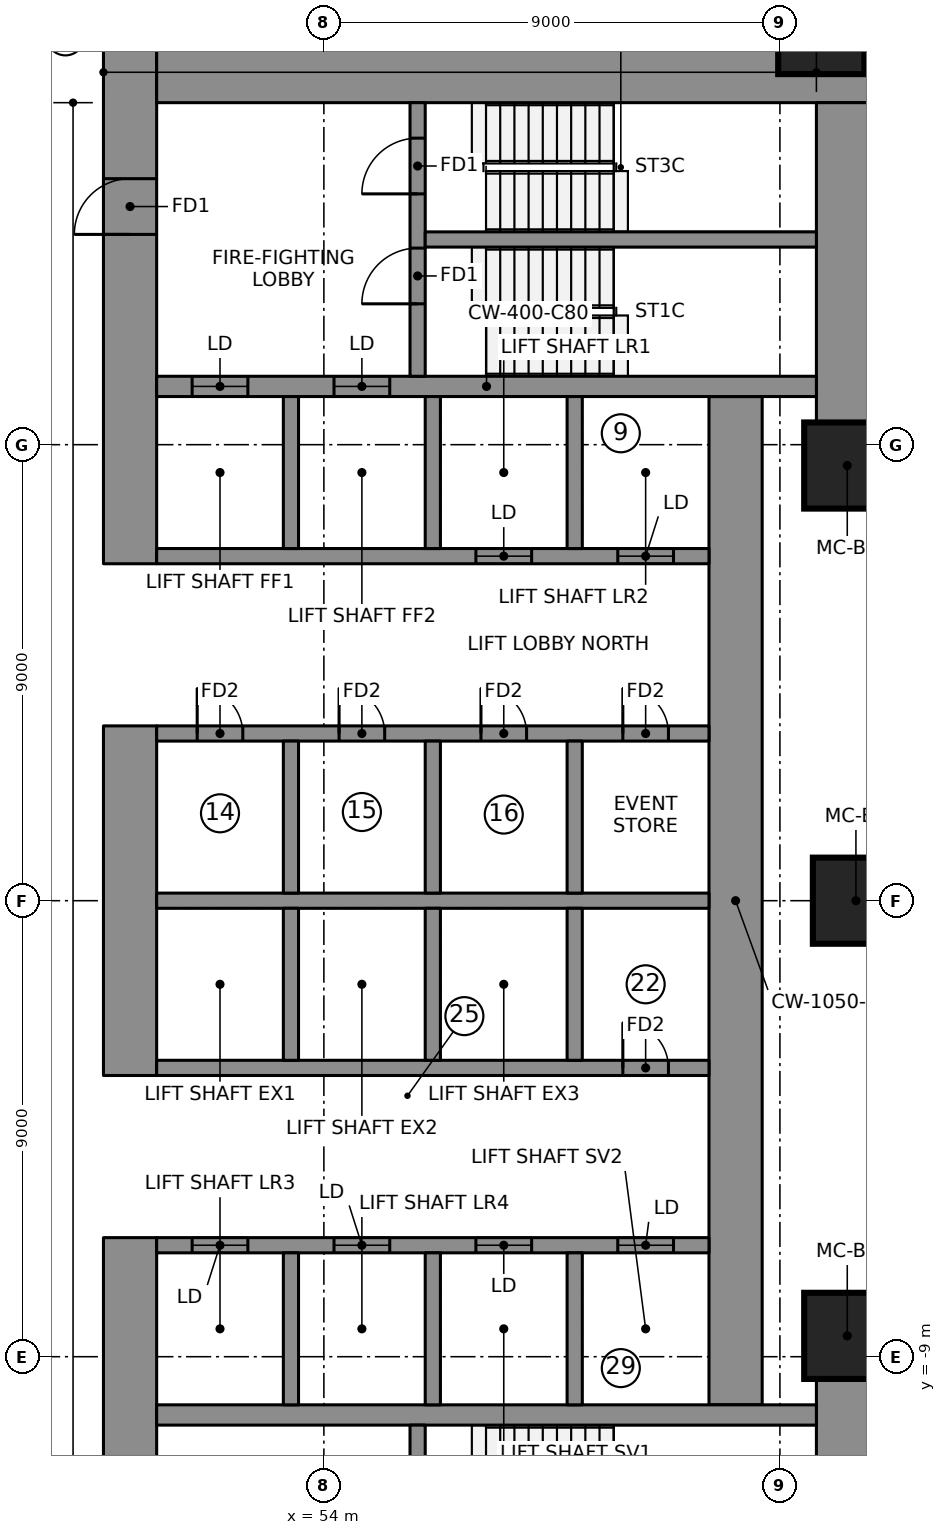
"""IFC4 building model, lengths in metres.
Left out: names, types, materials, properties, quantities, classifications, styles, units other than length and angle.
Written with IfcOpenShell. Run it as: python <this file> out.ifc"""

import sys

from ifc_helpers import new_model, si_unit, direction, frame, frame_2d, origin, origin_2d, place, context, subcontext, project, spatial, rectangle, extrude, element, fill, save


model = new_model("IFC4")
c1 = context("Model", 3, precision=1e-05, world=origin(), true_north=direction((0.0, 1.0)))
c2 = subcontext(c1, "Body", "Model", "MODEL_VIEW")
j1 = project(units=[si_unit("LENGTHUNIT", "METRE"), si_unit("PLANEANGLEUNIT", "RADIAN")], contexts=[c1])
p1 = place(None, origin())
s1 = spatial("IfcSite", under=j1, at=p1, CompositionType="ELEMENT")
p2 = place(p1, origin())
s2 = spatial("IfcBuilding", under=s1, at=p2, CompositionType="ELEMENT")
p3 = place(p2, frame((0.0, 0.0, 99.1)))
s3 = spatial("IfcBuildingStorey", under=s2, at=p3, CompositionType="ELEMENT", Elevation=99.1)
p4 = place(p3, frame((50.175, 6.65, 0.0), z_axis=(0.0, 0.0, 1.0), x_axis=(0.0, 1.0, 0.0)))
e1 = element("IfcWall", 1, at=p4, inside=s3, PredefinedType="SHEAR", context=c2, shape_type="SweptSolid", body=[
    extrude(rectangle(XDim=10.15, YDim=1.05, at=frame_2d((5.075, 0.0))), origin(), (0.0, 0.0, 1.0), 3.55),
])
p5 = place(p4, frame((6.5, 0.0, 0.0)))
e2 = element("IfcOpeningElement", 2, at=p5, cuts=e1, PredefinedType="OPENING", context=c2, shape_type="SweptSolid", body=[
    extrude(rectangle(XDim=1.1, YDim=2.1, at=frame_2d((0.55, 1.05))), frame((0.0, 0.535, 0.0), z_axis=(0.0, -1.0, 0.0), x_axis=(1.0, 0.0, 0.0)), (0.0, 0.0, 1.0), 1.07),
])
p6 = place(p3, frame((50.175, -3.45, 0.0), z_axis=(0.0, 0.0, 1.0), x_axis=(0.0, 1.0, 0.0)))
e3 = element("IfcWall", 3, at=p6, inside=s3, PredefinedType="SHEAR", context=c2, shape_type="SweptSolid", body=[
    extrude(rectangle(XDim=6.9, YDim=1.05, at=frame_2d((3.45, 0.0))), origin(), (0.0, 0.0, 1.0), 3.55),
])
p7 = place(p3, frame((50.175, -16.8, 0.0), z_axis=(0.0, 0.0, 1.0), x_axis=(0.0, 1.0, 0.0)))
e4 = element("IfcWall", 4, at=p7, inside=s3, PredefinedType="SHEAR", context=c2, shape_type="SweptSolid", body=[
    extrude(rectangle(XDim=10.15, YDim=1.05, at=frame_2d((5.075, 0.0))), origin(), (0.0, 0.0, 1.0), 3.55),
])
p8 = place(p7, frame((2.55, 0.0, 0.0)))
e5 = element("IfcOpeningElement", 5, at=p8, cuts=e4, PredefinedType="OPENING", context=c2, shape_type="SweptSolid", body=[
    extrude(rectangle(XDim=1.1, YDim=2.1, at=frame_2d((0.55, 1.05))), frame((0.0, 0.535, 0.0), z_axis=(0.0, -1.0, 0.0), x_axis=(1.0, 0.0, 0.0)), (0.0, 0.0, 1.0), 1.07),
])
p9 = place(p3, frame((50.7, 16.275, 0.0), z_axis=(0.0, 0.0, 1.0), x_axis=(1.0, 0.0, 0.0)))
e6 = element("IfcWall", 6, at=p9, inside=s3, PredefinedType="SHEAR", context=c2, shape_type="SweptSolid", body=[
    extrude(rectangle(XDim=14.07, YDim=1.05, at=frame_2d((7.035, 0.0))), origin(), (0.0, 0.0, 1.0), 3.55),
])
for number, where, z_axis, x_axis in (
    (7, (64.245, 9.389, 0.0), (0.0, 0.0, 1.0), (0.0, 1.0, 0.0)),
    (8, (64.245, -15.75, 0.0), (0.0, 0.0, 1.0), (0.0, 1.0, 0.0)),
):
    element("IfcWall", number, at=place(p3, frame(where, z_axis=z_axis, x_axis=x_axis)), inside=s3, PredefinedType="SHEAR", context=c2, shape_type="SweptSolid", body=[
        extrude(rectangle(XDim=6.361, YDim=1.05, at=frame_2d((3.181, 0.0))), origin(), (0.0, 0.0, 1.0), 3.55),
    ])
p10 = place(p3, frame((62.125, -9.95, 0.0), z_axis=(0.0, 0.0, 1.0), x_axis=(0.0, 1.0, 0.0)))
e9 = element("IfcWall", 9, at=p10, inside=s3, PredefinedType="SHEAR", context=c2, shape_type="SweptSolid", body=[
    extrude(rectangle(XDim=19.9, YDim=1.05, at=frame_2d((9.95, 0.0))), origin(), (0.0, 0.0, 1.0), 3.55),
])
p11 = place(p3, frame((50.7, 10.15, 0.0), z_axis=(0.0, 0.0, 1.0), x_axis=(1.0, 0.0, 0.0)))
e10 = element("IfcWall", 10, at=p11, inside=s3, PredefinedType="SHEAR", context=c2, shape_type="SweptSolid", body=[
    extrude(rectangle(XDim=13.02, YDim=0.4, at=frame_2d((6.51, 0.0))), origin(), (0.0, 0.0, 1.0), 3.55),
])
p12 = place(p11, frame((0.7, 0.0, 0.0)))
e11 = element("IfcOpeningElement", 11, at=p12, cuts=e10, PredefinedType="OPENING", context=c2, shape_type="SweptSolid", body=[
    extrude(rectangle(XDim=1.1, YDim=2.1, at=frame_2d((0.55, 1.05))), frame((0.0, 0.21, 0.0), z_axis=(0.0, -1.0, 0.0), x_axis=(1.0, 0.0, 0.0)), (0.0, 0.0, 1.0), 0.42),
])
p13 = place(p11, frame((3.5, 0.0, 0.0)))
e12 = element("IfcOpeningElement", 12, at=p13, cuts=e10, PredefinedType="OPENING", context=c2, shape_type="SweptSolid", body=[
    extrude(rectangle(XDim=1.1, YDim=2.1, at=frame_2d((0.55, 1.05))), frame((0.0, 0.21, 0.0), z_axis=(0.0, -1.0, 0.0), x_axis=(1.0, 0.0, 0.0)), (0.0, 0.0, 1.0), 0.42),
])
p14 = place(p3, frame((50.7, -10.15, 0.0), z_axis=(0.0, 0.0, 1.0), x_axis=(1.0, 0.0, 0.0)))
e13 = element("IfcWall", 13, at=p14, inside=s3, PredefinedType="SHEAR", context=c2, shape_type="SweptSolid", body=[
    extrude(rectangle(XDim=13.02, YDim=0.4, at=frame_2d((6.51, 0.0))), origin(), (0.0, 0.0, 1.0), 3.55),
])
p15 = place(p3, frame((50.7, 0.0, 0.0), z_axis=(0.0, 0.0, 1.0), x_axis=(1.0, 0.0, 0.0)))
e14 = element("IfcWall", 14, at=p15, inside=s3, PredefinedType="SHEAR", context=c2, shape_type="SweptSolid", body=[
    extrude(rectangle(XDim=10.9, YDim=0.3, at=frame_2d((5.45, 0.0))), origin(), (0.0, 0.0, 1.0), 3.55),
])
p16 = place(p3, frame((50.7, 3.3, 0.0), z_axis=(0.0, 0.0, 1.0), x_axis=(1.0, 0.0, 0.0)))
e15 = element("IfcWall", 15, at=p16, inside=s3, PredefinedType="SHEAR", context=c2, shape_type="SweptSolid", body=[
    extrude(rectangle(XDim=10.9, YDim=0.3, at=frame_2d((5.45, 0.0))), origin(), (0.0, 0.0, 1.0), 3.55),
])
p17 = place(p16, frame((0.8, 0.0, 0.0)))
e16 = element("IfcOpeningElement", 16, at=p17, cuts=e15, PredefinedType="OPENING", context=c2, shape_type="SweptSolid", body=[
    extrude(rectangle(XDim=0.9, YDim=2.1, at=frame_2d((0.45, 1.05))), frame((0.0, 0.16, 0.0), z_axis=(0.0, -1.0, 0.0), x_axis=(1.0, 0.0, 0.0)), (0.0, 0.0, 1.0), 0.32),
])
p18 = place(p16, frame((3.6, 0.0, 0.0)))
e17 = element("IfcOpeningElement", 17, at=p18, cuts=e15, PredefinedType="OPENING", context=c2, shape_type="SweptSolid", body=[
    extrude(rectangle(XDim=0.9, YDim=2.1, at=frame_2d((0.45, 1.05))), frame((0.0, 0.16, 0.0), z_axis=(0.0, -1.0, 0.0), x_axis=(1.0, 0.0, 0.0)), (0.0, 0.0, 1.0), 0.32),
])
p19 = place(p16, frame((6.4, 0.0, 0.0)))
e18 = element("IfcOpeningElement", 18, at=p19, cuts=e15, PredefinedType="OPENING", context=c2, shape_type="SweptSolid", body=[
    extrude(rectangle(XDim=0.9, YDim=2.1, at=frame_2d((0.45, 1.05))), frame((0.0, 0.16, 0.0), z_axis=(0.0, -1.0, 0.0), x_axis=(1.0, 0.0, 0.0)), (0.0, 0.0, 1.0), 0.32),
])
p20 = place(p16, frame((9.2, 0.0, 0.0)))
e19 = element("IfcOpeningElement", 19, at=p20, cuts=e15, PredefinedType="OPENING", context=c2, shape_type="SweptSolid", body=[
    extrude(rectangle(XDim=0.9, YDim=2.1, at=frame_2d((0.45, 1.05))), frame((0.0, 0.16, 0.0), z_axis=(0.0, -1.0, 0.0), x_axis=(1.0, 0.0, 0.0)), (0.0, 0.0, 1.0), 0.32),
])
p21 = place(p3, frame((50.7, 6.8, 0.0), z_axis=(0.0, 0.0, 1.0), x_axis=(1.0, 0.0, 0.0)))
e20 = element("IfcWall", 20, at=p21, inside=s3, PredefinedType="SHEAR", context=c2, shape_type="SweptSolid", body=[
    extrude(rectangle(XDim=10.9, YDim=0.3, at=frame_2d((5.45, 0.0))), origin(), (0.0, 0.0, 1.0), 3.55),
])
p22 = place(p21, frame((6.3, 0.0, 0.0)))
e21 = element("IfcOpeningElement", 21, at=p22, cuts=e20, PredefinedType="OPENING", context=c2, shape_type="SweptSolid", body=[
    extrude(rectangle(XDim=1.1, YDim=2.1, at=frame_2d((0.55, 1.05))), frame((0.0, 0.16, 0.0), z_axis=(0.0, -1.0, 0.0), x_axis=(1.0, 0.0, 0.0)), (0.0, 0.0, 1.0), 0.32),
])
p23 = place(p21, frame((9.1, 0.0, 0.0)))
e22 = element("IfcOpeningElement", 22, at=p23, cuts=e20, PredefinedType="OPENING", context=c2, shape_type="SweptSolid", body=[
    extrude(rectangle(XDim=1.1, YDim=2.1, at=frame_2d((0.55, 1.05))), frame((0.0, 0.16, 0.0), z_axis=(0.0, -1.0, 0.0), x_axis=(1.0, 0.0, 0.0)), (0.0, 0.0, 1.0), 0.32),
])
for number, where, z_axis, x_axis in (
    (23, (53.35, 0.15, 0.0), (0.0, 0.0, 1.0), (0.0, 1.0, 0.0)),
    (24, (53.35, 6.95, 0.0), (0.0, 0.0, 1.0), (0.0, 1.0, 0.0)),
    (25, (56.15, 0.15, 0.0), (0.0, 0.0, 1.0), (0.0, 1.0, 0.0)),
    (26, (56.15, 6.95, 0.0), (0.0, 0.0, 1.0), (0.0, 1.0, 0.0)),
    (27, (58.95, 0.15, 0.0), (0.0, 0.0, 1.0), (0.0, 1.0, 0.0)),
    (28, (58.95, 6.95, 0.0), (0.0, 0.0, 1.0), (0.0, 1.0, 0.0)),
):
    element("IfcWall", number, at=place(p3, frame(where, z_axis=z_axis, x_axis=x_axis)), inside=s3, PredefinedType="SHEAR", context=c2, shape_type="SweptSolid", body=[
        extrude(rectangle(XDim=3.0, YDim=0.3, at=frame_2d((1.5, 0.0))), origin(), (0.0, 0.0, 1.0), 3.55),
    ])
p24 = place(p3, frame((50.7, -3.3, 0.0), z_axis=(0.0, 0.0, 1.0), x_axis=(1.0, 0.0, 0.0)))
e29 = element("IfcWall", 29, at=p24, inside=s3, PredefinedType="SHEAR", context=c2, shape_type="SweptSolid", body=[
    extrude(rectangle(XDim=10.9, YDim=0.3, at=frame_2d((5.45, 0.0))), origin(), (0.0, 0.0, 1.0), 3.55),
])
p25 = place(p24, frame((9.2, 0.0, 0.0)))
e30 = element("IfcOpeningElement", 30, at=p25, cuts=e29, PredefinedType="OPENING", context=c2, shape_type="SweptSolid", body=[
    extrude(rectangle(XDim=0.9, YDim=2.1, at=frame_2d((0.45, 1.05))), frame((0.0, 0.16, 0.0), z_axis=(0.0, -1.0, 0.0), x_axis=(1.0, 0.0, 0.0)), (0.0, 0.0, 1.0), 0.32),
])
p26 = place(p3, frame((50.7, -6.8, 0.0), z_axis=(0.0, 0.0, 1.0), x_axis=(1.0, 0.0, 0.0)))
e31 = element("IfcWall", 31, at=p26, inside=s3, PredefinedType="SHEAR", context=c2, shape_type="SweptSolid", body=[
    extrude(rectangle(XDim=10.9, YDim=0.3, at=frame_2d((5.45, 0.0))), origin(), (0.0, 0.0, 1.0), 3.55),
])
p27 = place(p26, frame((0.7, 0.0, 0.0)))
e32 = element("IfcOpeningElement", 32, at=p27, cuts=e31, PredefinedType="OPENING", context=c2, shape_type="SweptSolid", body=[
    extrude(rectangle(XDim=1.1, YDim=2.1, at=frame_2d((0.55, 1.05))), frame((0.0, 0.16, 0.0), z_axis=(0.0, -1.0, 0.0), x_axis=(1.0, 0.0, 0.0)), (0.0, 0.0, 1.0), 0.32),
])
p28 = place(p26, frame((3.5, 0.0, 0.0)))
e33 = element("IfcOpeningElement", 33, at=p28, cuts=e31, PredefinedType="OPENING", context=c2, shape_type="SweptSolid", body=[
    extrude(rectangle(XDim=1.1, YDim=2.1, at=frame_2d((0.55, 1.05))), frame((0.0, 0.16, 0.0), z_axis=(0.0, -1.0, 0.0), x_axis=(1.0, 0.0, 0.0)), (0.0, 0.0, 1.0), 0.32),
])
p29 = place(p26, frame((6.3, 0.0, 0.0)))
e34 = element("IfcOpeningElement", 34, at=p29, cuts=e31, PredefinedType="OPENING", context=c2, shape_type="SweptSolid", body=[
    extrude(rectangle(XDim=1.1, YDim=2.1, at=frame_2d((0.55, 1.05))), frame((0.0, 0.16, 0.0), z_axis=(0.0, -1.0, 0.0), x_axis=(1.0, 0.0, 0.0)), (0.0, 0.0, 1.0), 0.32),
])
p30 = place(p26, frame((9.1, 0.0, 0.0)))
e35 = element("IfcOpeningElement", 35, at=p30, cuts=e31, PredefinedType="OPENING", context=c2, shape_type="SweptSolid", body=[
    extrude(rectangle(XDim=1.1, YDim=2.1, at=frame_2d((0.55, 1.05))), frame((0.0, 0.16, 0.0), z_axis=(0.0, -1.0, 0.0), x_axis=(1.0, 0.0, 0.0)), (0.0, 0.0, 1.0), 0.32),
])
for number, where, z_axis, x_axis in (
    (36, (53.35, -3.15, 0.0), (0.0, 0.0, 1.0), (0.0, 1.0, 0.0)),
    (37, (53.35, -9.95, 0.0), (0.0, 0.0, 1.0), (0.0, 1.0, 0.0)),
    (38, (56.15, -3.15, 0.0), (0.0, 0.0, 1.0), (0.0, 1.0, 0.0)),
    (39, (56.15, -9.95, 0.0), (0.0, 0.0, 1.0), (0.0, 1.0, 0.0)),
    (40, (58.95, -3.15, 0.0), (0.0, 0.0, 1.0), (0.0, 1.0, 0.0)),
    (41, (58.95, -9.95, 0.0), (0.0, 0.0, 1.0), (0.0, 1.0, 0.0)),
):
    element("IfcWall", number, at=place(p3, frame(where, z_axis=z_axis, x_axis=x_axis)), inside=s3, PredefinedType="SHEAR", context=c2, shape_type="SweptSolid", body=[
        extrude(rectangle(XDim=3.0, YDim=0.3, at=frame_2d((1.5, 0.0))), origin(), (0.0, 0.0, 1.0), 3.55),
    ])
p31 = place(p3, frame((55.85, 10.35, 0.0), z_axis=(0.0, 0.0, 1.0), x_axis=(0.0, 1.0, 0.0)))
e42 = element("IfcWall", 42, at=p31, inside=s3, PredefinedType="SHEAR", context=c2, shape_type="SweptSolid", body=[
    extrude(rectangle(XDim=5.4, YDim=0.3, at=frame_2d((2.7, 0.0))), origin(), (0.0, 0.0, 1.0), 3.55),
])
p32 = place(p31, frame((1.43, 0.0, 0.0)))
e43 = element("IfcOpeningElement", 43, at=p32, cuts=e42, PredefinedType="OPENING", context=c2, shape_type="SweptSolid", body=[
    extrude(rectangle(XDim=1.1, YDim=2.1, at=frame_2d((0.55, 1.05))), frame((0.0, 0.16, 0.0), z_axis=(0.0, -1.0, 0.0), x_axis=(1.0, 0.0, 0.0)), (0.0, 0.0, 1.0), 0.32),
])
p33 = place(p31, frame((3.6, 0.0, 0.0)))
e44 = element("IfcOpeningElement", 44, at=p33, cuts=e42, PredefinedType="OPENING", context=c2, shape_type="SweptSolid", body=[
    extrude(rectangle(XDim=1.1, YDim=2.1, at=frame_2d((0.55, 1.05))), frame((0.0, 0.16, 0.0), z_axis=(0.0, -1.0, 0.0), x_axis=(1.0, 0.0, 0.0)), (0.0, 0.0, 1.0), 0.32),
])
p34 = place(p3, frame((55.85, -15.75, 0.0), z_axis=(0.0, 0.0, 1.0), x_axis=(0.0, 1.0, 0.0)))
e45 = element("IfcWall", 45, at=p34, inside=s3, PredefinedType="SHEAR", context=c2, shape_type="SweptSolid", body=[
    extrude(rectangle(XDim=5.4, YDim=0.3, at=frame_2d((2.7, 0.0))), origin(), (0.0, 0.0, 1.0), 3.55),
])
p35 = place(p34, frame((3.6, 0.0, 0.0)))
e46 = element("IfcOpeningElement", 46, at=p35, cuts=e45, PredefinedType="OPENING", context=c2, shape_type="SweptSolid", body=[
    extrude(rectangle(XDim=1.1, YDim=2.1, at=frame_2d((0.55, 1.05))), frame((0.0, 0.16, 0.0), z_axis=(0.0, -1.0, 0.0), x_axis=(1.0, 0.0, 0.0)), (0.0, 0.0, 1.0), 0.32),
])
p36 = place(p34, frame((0.8, 0.0, 0.0)))
e47 = element("IfcOpeningElement", 47, at=p36, cuts=e45, PredefinedType="OPENING", context=c2, shape_type="SweptSolid", body=[
    extrude(rectangle(XDim=0.9, YDim=2.1, at=frame_2d((0.45, 1.05))), frame((0.0, 0.16, 0.0), z_axis=(0.0, -1.0, 0.0), x_axis=(1.0, 0.0, 0.0)), (0.0, 0.0, 1.0), 0.32),
])
p37 = place(p3, frame((56.0, 13.05, 0.0), z_axis=(0.0, 0.0, 1.0), x_axis=(1.0, 0.0, 0.0)))
e48 = element("IfcWall", 48, at=p37, inside=s3, PredefinedType="SHEAR", context=c2, shape_type="SweptSolid", body=[
    extrude(rectangle(XDim=7.72, YDim=0.3, at=frame_2d((3.86, 0.0))), origin(), (0.0, 0.0, 1.0), 3.55),
])
for number, where, z_axis, x_axis in (
    (49, (64.329, -8.589, 0.0), (0.0, 0.0, 1.0), (1.0, 0.0, 0.0)),
    (50, (64.5, 0.0, 0.0), (0.0, 0.0, 1.0), (1.0, 0.0, 0.0)),
    (51, (64.329, 8.589, 0.0), (0.0, 0.0, 1.0), (1.0, 0.0, 0.0)),
    (52, (63.816, 17.164, 0.0), (0.0, 0.0, 1.0), (1.0, 0.0, 0.0)),
):
    element("IfcColumn", number, at=place(p3, frame(where, z_axis=z_axis, x_axis=x_axis)), inside=s3, PredefinedType="COLUMN", context=c2, shape_type="SweptSolid", body=[
        extrude(rectangle(XDim=1.7, YDim=1.7, at=origin_2d()), origin(), (0.0, 0.0, 1.0), 3.55),
    ])
p38 = place(p12, origin())
e53 = element("IfcDoor", 53, at=p38, inside=s3, OperationType="DOUBLE_DOOR_SLIDING", PredefinedType="DOOR", context=c2, shape_type="SweptSolid", body=[
    extrude(rectangle(XDim=1.1, YDim=2.1, at=frame_2d((0.55, 1.05))), frame((0.0, 0.025, 0.0), z_axis=(0.0, -1.0, 0.0), x_axis=(1.0, 0.0, 0.0)), (0.0, 0.0, 1.0), 0.05),
])
fill(e11, e53)
p39 = place(p13, origin())
e54 = element("IfcDoor", 54, at=p39, inside=s3, OperationType="DOUBLE_DOOR_SLIDING", PredefinedType="DOOR", context=c2, shape_type="SweptSolid", body=[
    extrude(rectangle(XDim=1.1, YDim=2.1, at=frame_2d((0.55, 1.05))), frame((0.0, 0.025, 0.0), z_axis=(0.0, -1.0, 0.0), x_axis=(1.0, 0.0, 0.0)), (0.0, 0.0, 1.0), 0.05),
])
fill(e12, e54)
p40 = place(p22, origin())
e55 = element("IfcDoor", 55, at=p40, inside=s3, OperationType="DOUBLE_DOOR_SLIDING", PredefinedType="DOOR", context=c2, shape_type="SweptSolid", body=[
    extrude(rectangle(XDim=1.1, YDim=2.1, at=frame_2d((0.55, 1.05))), frame((0.0, 0.025, 0.0), z_axis=(0.0, -1.0, 0.0), x_axis=(1.0, 0.0, 0.0)), (0.0, 0.0, 1.0), 0.05),
])
fill(e21, e55)
p41 = place(p23, origin())
e56 = element("IfcDoor", 56, at=p41, inside=s3, OperationType="DOUBLE_DOOR_SLIDING", PredefinedType="DOOR", context=c2, shape_type="SweptSolid", body=[
    extrude(rectangle(XDim=1.1, YDim=2.1, at=frame_2d((0.55, 1.05))), frame((0.0, 0.025, 0.0), z_axis=(0.0, -1.0, 0.0), x_axis=(1.0, 0.0, 0.0)), (0.0, 0.0, 1.0), 0.05),
])
fill(e22, e56)
p42 = place(p27, origin())
e57 = element("IfcDoor", 57, at=p42, inside=s3, OperationType="DOUBLE_DOOR_SLIDING", PredefinedType="DOOR", context=c2, shape_type="SweptSolid", body=[
    extrude(rectangle(XDim=1.1, YDim=2.1, at=frame_2d((0.55, 1.05))), frame((0.0, 0.025, 0.0), z_axis=(0.0, -1.0, 0.0), x_axis=(1.0, 0.0, 0.0)), (0.0, 0.0, 1.0), 0.05),
])
fill(e32, e57)
p43 = place(p28, origin())
e58 = element("IfcDoor", 58, at=p43, inside=s3, OperationType="DOUBLE_DOOR_SLIDING", PredefinedType="DOOR", context=c2, shape_type="SweptSolid", body=[
    extrude(rectangle(XDim=1.1, YDim=2.1, at=frame_2d((0.55, 1.05))), frame((0.0, 0.025, 0.0), z_axis=(0.0, -1.0, 0.0), x_axis=(1.0, 0.0, 0.0)), (0.0, 0.0, 1.0), 0.05),
])
fill(e33, e58)
p44 = place(p29, origin())
e59 = element("IfcDoor", 59, at=p44, inside=s3, OperationType="DOUBLE_DOOR_SLIDING", PredefinedType="DOOR", context=c2, shape_type="SweptSolid", body=[
    extrude(rectangle(XDim=1.1, YDim=2.1, at=frame_2d((0.55, 1.05))), frame((0.0, 0.025, 0.0), z_axis=(0.0, -1.0, 0.0), x_axis=(1.0, 0.0, 0.0)), (0.0, 0.0, 1.0), 0.05),
])
fill(e34, e59)
p45 = place(p30, origin())
e60 = element("IfcDoor", 60, at=p45, inside=s3, OperationType="DOUBLE_DOOR_SLIDING", PredefinedType="DOOR", context=c2, shape_type="SweptSolid", body=[
    extrude(rectangle(XDim=1.1, YDim=2.1, at=frame_2d((0.55, 1.05))), frame((0.0, 0.025, 0.0), z_axis=(0.0, -1.0, 0.0), x_axis=(1.0, 0.0, 0.0)), (0.0, 0.0, 1.0), 0.05),
])
fill(e35, e60)
p46 = place(p32, origin())
e61 = element("IfcDoor", 61, at=p46, inside=s3, OperationType="SINGLE_SWING_RIGHT", PredefinedType="DOOR", context=c2, shape_type="SweptSolid", body=[
    extrude(rectangle(XDim=1.1, YDim=2.1, at=frame_2d((0.55, 1.05))), frame((0.0, 0.025, 0.0), z_axis=(0.0, -1.0, 0.0), x_axis=(1.0, 0.0, 0.0)), (0.0, 0.0, 1.0), 0.05),
])
fill(e43, e61)
p47 = place(p33, origin())
e62 = element("IfcDoor", 62, at=p47, inside=s3, OperationType="SINGLE_SWING_RIGHT", PredefinedType="DOOR", context=c2, shape_type="SweptSolid", body=[
    extrude(rectangle(XDim=1.1, YDim=2.1, at=frame_2d((0.55, 1.05))), frame((0.0, 0.025, 0.0), z_axis=(0.0, -1.0, 0.0), x_axis=(1.0, 0.0, 0.0)), (0.0, 0.0, 1.0), 0.05),
])
fill(e44, e62)
p48 = place(p5, origin())
e63 = element("IfcDoor", 63, at=p48, inside=s3, OperationType="SINGLE_SWING_RIGHT", PredefinedType="DOOR", context=c2, shape_type="SweptSolid", body=[
    extrude(rectangle(XDim=1.1, YDim=2.1, at=frame_2d((0.55, 1.05))), frame((0.0, 0.025, 0.0), z_axis=(0.0, -1.0, 0.0), x_axis=(1.0, 0.0, 0.0)), (0.0, 0.0, 1.0), 0.05),
])
fill(e2, e63)
p49 = place(p17, origin())
e64 = element("IfcDoor", 64, at=p49, inside=s3, OperationType="SINGLE_SWING_LEFT", PredefinedType="DOOR", context=c2, shape_type="SweptSolid", body=[
    extrude(rectangle(XDim=0.9, YDim=2.1, at=frame_2d((0.45, 1.05))), frame((0.0, 0.025, 0.0), z_axis=(0.0, -1.0, 0.0), x_axis=(1.0, 0.0, 0.0)), (0.0, 0.0, 1.0), 0.05),
])
fill(e16, e64)
p50 = place(p18, origin())
e65 = element("IfcDoor", 65, at=p50, inside=s3, OperationType="SINGLE_SWING_LEFT", PredefinedType="DOOR", context=c2, shape_type="SweptSolid", body=[
    extrude(rectangle(XDim=0.9, YDim=2.1, at=frame_2d((0.45, 1.05))), frame((0.0, 0.025, 0.0), z_axis=(0.0, -1.0, 0.0), x_axis=(1.0, 0.0, 0.0)), (0.0, 0.0, 1.0), 0.05),
])
fill(e17, e65)
p51 = place(p19, origin())
e66 = element("IfcDoor", 66, at=p51, inside=s3, OperationType="SINGLE_SWING_LEFT", PredefinedType="DOOR", context=c2, shape_type="SweptSolid", body=[
    extrude(rectangle(XDim=0.9, YDim=2.1, at=frame_2d((0.45, 1.05))), frame((0.0, 0.025, 0.0), z_axis=(0.0, -1.0, 0.0), x_axis=(1.0, 0.0, 0.0)), (0.0, 0.0, 1.0), 0.05),
])
fill(e18, e66)
p52 = place(p20, origin())
e67 = element("IfcDoor", 67, at=p52, inside=s3, OperationType="SINGLE_SWING_LEFT", PredefinedType="DOOR", context=c2, shape_type="SweptSolid", body=[
    extrude(rectangle(XDim=0.9, YDim=2.1, at=frame_2d((0.45, 1.05))), frame((0.0, 0.025, 0.0), z_axis=(0.0, -1.0, 0.0), x_axis=(1.0, 0.0, 0.0)), (0.0, 0.0, 1.0), 0.05),
])
fill(e19, e67)
p53 = place(p25, origin())
e68 = element("IfcDoor", 68, at=p53, inside=s3, OperationType="SINGLE_SWING_LEFT", PredefinedType="DOOR", context=c2, shape_type="SweptSolid", body=[
    extrude(rectangle(XDim=0.9, YDim=2.1, at=frame_2d((0.45, 1.05))), frame((0.0, 0.025, 0.0), z_axis=(0.0, -1.0, 0.0), x_axis=(1.0, 0.0, 0.0)), (0.0, 0.0, 1.0), 0.05),
])
fill(e30, e68)
save(model, sys.argv[1])
